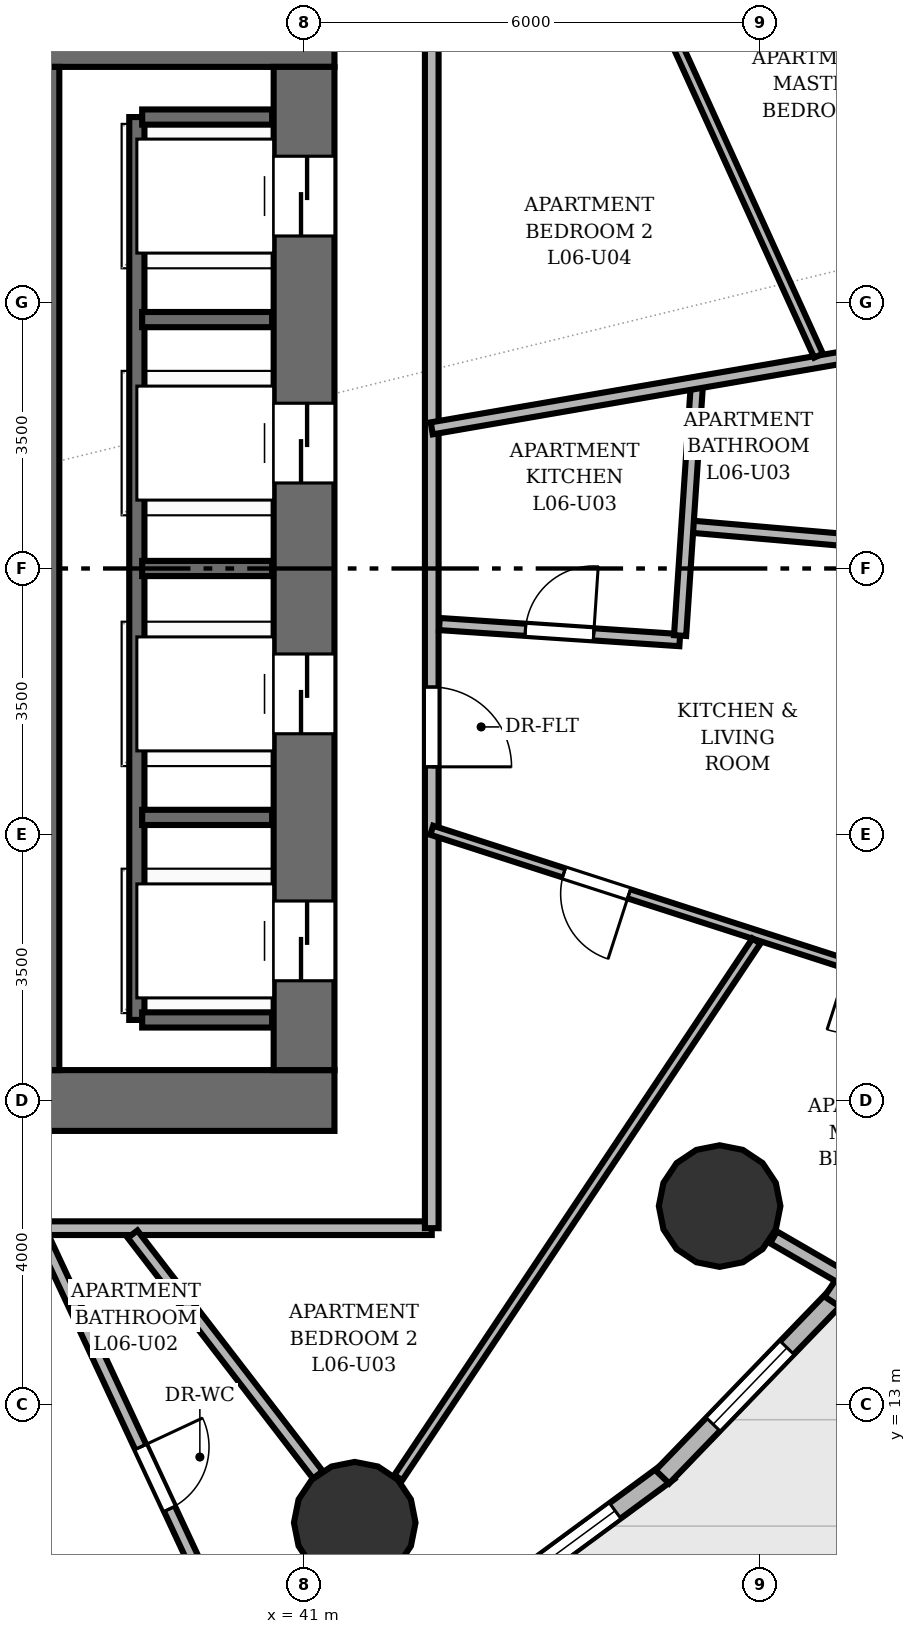
"""IFC4 building model, lengths in metres.
Left out: names, types, materials, properties, quantities, classifications, styles, units other than length and angle.
Written with IfcOpenShell. Run it as: python <this file> out.ifc"""

import sys

from ifc_helpers import new_model, si_unit, direction, frame, frame_2d, origin, origin_2d, place, context, subcontext, project, spatial, rectangle, circle, extrude, element, fill, save


model = new_model("IFC4")
c1 = context("Model", 3, precision=1e-05, world=origin(), true_north=direction((0.0, 1.0)))
c2 = subcontext(c1, "Body", "Model", "MODEL_VIEW")
j1 = project(units=[si_unit("LENGTHUNIT", "METRE"), si_unit("PLANEANGLEUNIT", "RADIAN")], contexts=[c1])
p1 = place(None, origin())
s1 = spatial("IfcSite", under=j1, at=p1, CompositionType="ELEMENT")
p2 = place(p1, origin())
s2 = spatial("IfcBuilding", under=s1, at=p2, CompositionType="ELEMENT")
p3 = place(p2, frame((0.0, 0.0, 24.8)))
s3 = spatial("IfcBuildingStorey", under=s2, at=p3, CompositionType="ELEMENT", Elevation=24.8)
p4 = place(p3, frame((22.6, 17.0, 0.0), z_axis=(0.0, 0.0, 1.0), x_axis=(1.0, 0.0, 0.0)))
e1 = element("IfcWall", 1, at=p4, inside=s3, PredefinedType="SHEAR", context=c2, shape_type="SweptSolid", body=[
    extrude(rectangle(XDim=18.8, YDim=0.8, at=frame_2d((9.4, 0.0))), origin(), (0.0, 0.0, 1.0), 3.2),
])
p5 = place(p4, frame((5.9, 0.0, 0.0)))
e2 = element("IfcOpeningElement", 2, at=p5, cuts=e1, PredefinedType="OPENING", context=c2, shape_type="SweptSolid", body=[
    extrude(rectangle(XDim=1.1, YDim=2.15, at=frame_2d((0.55, 1.075))), frame((0.0, 0.41, 0.0), z_axis=(0.0, -1.0, 0.0), x_axis=(1.0, 0.0, 0.0)), (0.0, 0.0, 1.0), 0.82),
])
p6 = place(p4, frame((9.45, 0.0, 0.0)))
e3 = element("IfcOpeningElement", 3, at=p6, cuts=e1, PredefinedType="OPENING", context=c2, shape_type="SweptSolid", body=[
    extrude(rectangle(XDim=0.9, YDim=2.1, at=frame_2d((0.45, 1.05))), frame((0.0, 0.41, 0.0), z_axis=(0.0, -1.0, 0.0), x_axis=(1.0, 0.0, 0.0)), (0.0, 0.0, 1.0), 0.82),
])
p7 = place(p3, frame((22.6, 31.0, 0.0), z_axis=(0.0, 0.0, 1.0), x_axis=(1.0, 0.0, 0.0)))
e4 = element("IfcWall", 4, at=p7, inside=s3, PredefinedType="SHEAR", context=c2, shape_type="SweptSolid", body=[
    extrude(rectangle(XDim=18.8, YDim=0.8, at=frame_2d((9.4, 0.0))), origin(), (0.0, 0.0, 1.0), 3.2),
])
p8 = place(p7, frame((11.8, 0.0, 0.0)))
e5 = element("IfcOpeningElement", 5, at=p8, cuts=e4, PredefinedType="OPENING", context=c2, shape_type="SweptSolid", body=[
    extrude(rectangle(XDim=1.1, YDim=2.15, at=frame_2d((0.55, 1.075))), frame((0.0, 0.41, 0.0), z_axis=(0.0, -1.0, 0.0), x_axis=(1.0, 0.0, 0.0)), (0.0, 0.0, 1.0), 0.82),
])
p9 = place(p3, frame((41.0, 17.4, 0.0), z_axis=(0.0, 0.0, 1.0), x_axis=(0.0, 1.0, 0.0)))
e6 = element("IfcWall", 6, at=p9, inside=s3, PredefinedType="SHEAR", context=c2, shape_type="SweptSolid", body=[
    extrude(rectangle(XDim=13.2, YDim=0.8, at=frame_2d((6.6, 0.0))), origin(), (0.0, 0.0, 1.0), 3.2),
])
p10 = place(p9, frame((1.175, 0.0, 0.0)))
e7 = element("IfcOpeningElement", 7, at=p10, cuts=e6, PredefinedType="OPENING", context=c2, shape_type="SweptSolid", body=[
    extrude(rectangle(XDim=1.05, YDim=2.15, at=frame_2d((0.525, 1.075))), frame((0.0, 0.41, 0.0), z_axis=(0.0, -1.0, 0.0), x_axis=(1.0, 0.0, 0.0)), (0.0, 0.0, 1.0), 0.82),
])
p11 = place(p9, frame((4.425, 0.0, 0.0)))
e8 = element("IfcOpeningElement", 8, at=p11, cuts=e6, PredefinedType="OPENING", context=c2, shape_type="SweptSolid", body=[
    extrude(rectangle(XDim=1.05, YDim=2.15, at=frame_2d((0.525, 1.075))), frame((0.0, 0.41, 0.0), z_axis=(0.0, -1.0, 0.0), x_axis=(1.0, 0.0, 0.0)), (0.0, 0.0, 1.0), 0.82),
])
p12 = place(p9, frame((7.725, 0.0, 0.0)))
e9 = element("IfcOpeningElement", 9, at=p12, cuts=e6, PredefinedType="OPENING", context=c2, shape_type="SweptSolid", body=[
    extrude(rectangle(XDim=1.05, YDim=2.15, at=frame_2d((0.525, 1.075))), frame((0.0, 0.41, 0.0), z_axis=(0.0, -1.0, 0.0), x_axis=(1.0, 0.0, 0.0)), (0.0, 0.0, 1.0), 0.82),
])
p13 = place(p9, frame((10.975, 0.0, 0.0)))
e10 = element("IfcOpeningElement", 10, at=p13, cuts=e6, PredefinedType="OPENING", context=c2, shape_type="SweptSolid", body=[
    extrude(rectangle(XDim=1.05, YDim=2.15, at=frame_2d((0.525, 1.075))), frame((0.0, 0.41, 0.0), z_axis=(0.0, -1.0, 0.0), x_axis=(1.0, 0.0, 0.0)), (0.0, 0.0, 1.0), 0.82),
])
p14 = place(p3, frame((37.5, 17.4, 0.0), z_axis=(0.0, 0.0, 1.0), x_axis=(0.0, 1.0, 0.0)))
e11 = element("IfcWall", 11, at=p14, inside=s3, PredefinedType="SHEAR", context=c2, shape_type="SweptSolid", body=[
    extrude(rectangle(XDim=13.2, YDim=0.56, at=frame_2d((6.6, 0.0))), origin(), (0.0, 0.0, 1.0), 3.2),
])
for number, where, z_axis, x_axis in (
    (12, (41.667, 11.445, 0.0), (0.0, 0.0, 1.0), (1.0, 0.0, 0.0)),
    (13, (46.468, 15.611, 0.0), (0.0, 0.0, 1.0), (1.0, 0.0, 0.0)),
):
    element("IfcColumn", number, at=place(p3, frame(where, z_axis=z_axis, x_axis=x_axis)), inside=s3, PredefinedType="COLUMN", context=c2, shape_type="SweptSolid", body=[
        extrude(circle(Radius=0.8, at=origin_2d()), origin(), (0.0, 0.0, 1.0), 3.2),
    ])
p15 = place(p3, frame((45.798, 12.12, 0.0), z_axis=(0.0, 0.0, 1.0), x_axis=(-0.805405938507, -0.592723606935, 0.0)))
e14 = element("IfcWall", 14, at=p15, inside=s3, PredefinedType="SOLIDWALL", context=c2, shape_type="SweptSolid", body=[
    extrude(rectangle(XDim=3.399, YDim=0.25, at=frame_2d((1.699, 0.0))), origin(), (0.0, 0.0, 1.0), 2.96),
])
p16 = place(p15, frame((0.875, 0.0, 0.85)))
e15 = element("IfcOpeningElement", 15, at=p16, cuts=e14, PredefinedType="OPENING", context=c2, shape_type="SweptSolid", body=[
    extrude(rectangle(XDim=1.65, YDim=1.55, at=frame_2d((0.825, 0.775))), frame((0.0, 0.135, 0.0), z_axis=(0.0, -1.0, 0.0), x_axis=(1.0, 0.0, 0.0)), (0.0, 0.0, 1.0), 0.27),
])
p17 = place(p3, frame((48.021, 14.438, 0.0), z_axis=(0.0, 0.0, 1.0), x_axis=(-0.694392538781, -0.719596416115, 0.0)))
e16 = element("IfcWall", 16, at=p17, inside=s3, PredefinedType="SOLIDWALL", context=c2, shape_type="SweptSolid", body=[
    extrude(rectangle(XDim=3.323, YDim=0.25, at=frame_2d((1.661, 0.0))), origin(), (0.0, 0.0, 1.0), 2.96),
])
p18 = place(p17, frame((0.961, 0.0, 0.85)))
e17 = element("IfcOpeningElement", 17, at=p18, cuts=e16, PredefinedType="OPENING", context=c2, shape_type="SweptSolid", body=[
    extrude(rectangle(XDim=1.4, YDim=1.55, at=frame_2d((0.7, 0.775))), frame((0.0, 0.135, 0.0), z_axis=(0.0, -1.0, 0.0), x_axis=(1.0, 0.0, 0.0)), (0.0, 0.0, 1.0), 0.27),
])
p19 = place(p3, frame((49.758, 17.047, 0.0), z_axis=(0.0, 0.0, 1.0), x_axis=(-0.556764929833, -0.83067009872, 0.0)))
e18 = element("IfcWall", 18, at=p19, inside=s3, PredefinedType="SOLIDWALL", context=c2, shape_type="SweptSolid", body=[
    extrude(rectangle(XDim=3.244, YDim=0.25, at=frame_2d((1.622, 0.0))), origin(), (0.0, 0.0, 1.0), 2.96),
])
p20 = place(p3, frame((38.8, 18.06, 0.0), z_axis=(0.0, 0.0, 1.0), x_axis=(0.0, 1.0, 0.0)))
e19 = element("IfcWall", 19, at=p20, inside=s3, PredefinedType="SHEAR", context=c2, shape_type="SweptSolid", body=[
    extrude(rectangle(XDim=11.88, YDim=0.2, at=frame_2d((5.94, 0.0))), origin(), (0.0, 0.0, 1.0), 3.2),
])
for number, where, z_axis, x_axis in (
    (20, (38.87, 18.06, 0.0), (0.0, 0.0, 1.0), (1.0, 0.0, 0.0)),
    (21, (38.87, 29.94, 0.0), (0.0, 0.0, 1.0), (1.0, 0.0, 0.0)),
    (22, (38.87, 20.725, 0.0), (0.0, 0.0, 1.0), (1.0, 0.0, 0.0)),
    (23, (38.87, 24.0, 0.0), (0.0, 0.0, 1.0), (1.0, 0.0, 0.0)),
    (24, (38.87, 27.275, 0.0), (0.0, 0.0, 1.0), (1.0, 0.0, 0.0)),
):
    element("IfcWall", number, at=place(p3, frame(where, z_axis=z_axis, x_axis=x_axis)), inside=s3, PredefinedType="SHEAR", context=c2, shape_type="SweptSolid", body=[
        extrude(rectangle(XDim=1.71, YDim=0.2, at=frame_2d((0.855, 0.0))), origin(), (0.0, 0.0, 1.0), 3.2),
    ])
p21 = place(p3, frame((47.177, 15.2, 0.0), z_axis=(0.0, 0.0, 1.0), x_axis=(0.865001274409, -0.501769663562, 0.0)))
e25 = element("IfcWall", 25, at=p21, inside=s3, PredefinedType="PARTITIONING", context=c2, shape_type="SweptSolid", body=[
    extrude(rectangle(XDim=1.063, YDim=0.18, at=frame_2d((0.531, 0.0))), origin(), (0.0, 0.0, 1.0), 2.178),
])
p22 = place(p3, frame((42.68, 15.32, 0.0), z_axis=(0.0, 0.0, 1.0), x_axis=(-1.0, 0.0, 0.0)))
e26 = element("IfcWall", 26, at=p22, inside=s3, PredefinedType="PARTITIONING", context=c2, shape_type="SweptSolid", body=[
    extrude(rectangle(XDim=8.823, YDim=0.18, at=frame_2d((4.411, 0.0))), origin(), (0.0, 0.0, 1.0), 2.955),
])
p23 = place(p22, frame((6.462, 0.0, 0.0)))
e27 = element("IfcOpeningElement", 27, at=p23, cuts=e26, PredefinedType="OPENING", context=c2, shape_type="SweptSolid", body=[
    extrude(rectangle(XDim=1.05, YDim=2.15, at=frame_2d((0.525, 1.075))), frame((0.0, 0.1, 0.0), z_axis=(0.0, -1.0, 0.0), x_axis=(1.0, 0.0, 0.0)), (0.0, 0.0, 1.0), 0.2),
])
p24 = place(p3, frame((42.68, 32.68, 0.0), z_axis=(0.0, 0.0, 1.0), x_axis=(0.0, -1.0, 0.0)))
e28 = element("IfcWall", 28, at=p24, inside=s3, PredefinedType="PARTITIONING", context=c2, shape_type="SweptSolid", body=[
    extrude(rectangle(XDim=17.36, YDim=0.18, at=frame_2d((8.68, 0.0))), origin(), (0.0, 0.0, 1.0), 2.955),
])
p25 = place(p24, frame((10.24, 0.0, 0.0)))
e29 = element("IfcOpeningElement", 29, at=p25, cuts=e28, PredefinedType="OPENING", context=c2, shape_type="SweptSolid", body=[
    extrude(rectangle(XDim=1.05, YDim=2.15, at=frame_2d((0.525, 1.075))), frame((0.0, 0.1, 0.0), z_axis=(0.0, -1.0, 0.0), x_axis=(1.0, 0.0, 0.0)), (0.0, 0.0, 1.0), 0.2),
])
p26 = place(p3, frame((37.55, 15.229, 0.0), z_axis=(0.0, 0.0, 1.0), x_axis=(0.422745211231, -0.906248578692, 0.0)))
e30 = element("IfcWall", 30, at=p26, inside=s3, PredefinedType="PLUMBINGWALL", context=c2, shape_type="SweptSolid", body=[
    extrude(rectangle(XDim=7.052, YDim=0.16, at=frame_2d((3.526, 0.0))), origin(), (0.0, 0.0, 1.0), 2.641),
])
p27 = place(p26, frame((3.076, 0.0, 0.0)))
e31 = element("IfcOpeningElement", 31, at=p27, cuts=e30, PredefinedType="OPENING", context=c2, shape_type="SweptSolid", body=[
    extrude(rectangle(XDim=0.9, YDim=2.1, at=frame_2d((0.45, 1.05))), frame((0.0, 0.09, 0.0), z_axis=(0.0, -1.0, 0.0), x_axis=(1.0, 0.0, 0.0)), (0.0, 0.0, 1.0), 0.18),
])
p28 = place(p3, frame((38.744, 15.241, 0.0), z_axis=(0.0, 0.0, 1.0), x_axis=(0.610097434882, -0.792326397358, 0.0)))
e32 = element("IfcWall", 32, at=p28, inside=s3, PredefinedType="PLUMBINGWALL", context=c2, shape_type="SweptSolid", body=[
    extrude(rectangle(XDim=3.997, YDim=0.16, at=frame_2d((1.998, 0.0))), origin(), (0.0, 0.0, 1.0), 2.178),
])
p29 = place(p3, frame((46.044, 24.555, 0.0), z_axis=(0.0, 0.0, 1.0), x_axis=(0.996262385211, -0.086378584226, 0.0)))
e33 = element("IfcWall", 33, at=p29, inside=s3, PredefinedType="PLUMBINGWALL", context=c2, shape_type="SweptSolid", body=[
    extrude(rectangle(XDim=5.54, YDim=0.16, at=frame_2d((2.77, 0.0))), origin(), (0.0, 0.0, 1.0), 2.641),
])
p30 = place(p29, frame((2.32, 0.0, 0.0)))
e34 = element("IfcOpeningElement", 34, at=p30, cuts=e33, PredefinedType="OPENING", context=c2, shape_type="SweptSolid", body=[
    extrude(rectangle(XDim=0.9, YDim=2.1, at=frame_2d((0.45, 1.05))), frame((0.0, 0.09, 0.0), z_axis=(0.0, -1.0, 0.0), x_axis=(1.0, 0.0, 0.0)), (0.0, 0.0, 1.0), 0.18),
])
p31 = place(p3, frame((50.195, 18.132, 0.0), z_axis=(0.0, 0.0, 1.0), x_axis=(-0.951723769721, 0.306955804879, 0.0)))
e35 = element("IfcWall", 35, at=p31, inside=s3, PredefinedType="PARTITIONING", context=c2, shape_type="SweptSolid", body=[
    extrude(rectangle(XDim=7.896, YDim=0.125, at=frame_2d((3.948, 0.0))), origin(), (0.0, 0.0, 1.0), 2.955),
])
p32 = place(p31, frame((1.241, 0.0, 0.0)))
e36 = element("IfcOpeningElement", 36, at=p32, cuts=e35, PredefinedType="OPENING", context=c2, shape_type="SweptSolid", body=[
    extrude(rectangle(XDim=0.9, YDim=2.1, at=frame_2d((0.45, 1.05))), frame((0.0, 0.073, 0.0), z_axis=(0.0, -1.0, 0.0), x_axis=(1.0, 0.0, 0.0)), (0.0, 0.0, 1.0), 0.145),
])
p33 = place(p31, frame((5.169, 0.0, 0.0)))
e37 = element("IfcOpeningElement", 37, at=p33, cuts=e35, PredefinedType="OPENING", context=c2, shape_type="SweptSolid", body=[
    extrude(rectangle(XDim=0.9, YDim=2.1, at=frame_2d((0.45, 1.05))), frame((0.0, 0.073, 0.0), z_axis=(0.0, -1.0, 0.0), x_axis=(1.0, 0.0, 0.0)), (0.0, 0.0, 1.0), 0.145),
])
p34 = place(p3, frame((42.78, 23.269, 0.0), z_axis=(0.0, 0.0, 1.0), x_axis=(0.99776911562, -0.066759208461, 0.0)))
e38 = element("IfcWall", 38, at=p34, inside=s3, PredefinedType="PLUMBINGWALL", context=c2, shape_type="SweptSolid", body=[
    extrude(rectangle(XDim=3.171, YDim=0.16, at=frame_2d((1.585, 0.0))), origin(), (0.0, 0.0, 1.0), 2.641),
])
p35 = place(p34, frame((1.135, 0.0, 0.0)))
e39 = element("IfcOpeningElement", 39, at=p35, cuts=e38, PredefinedType="OPENING", context=c2, shape_type="SweptSolid", body=[
    extrude(rectangle(XDim=0.9, YDim=2.1, at=frame_2d((0.45, 1.05))), frame((0.0, 0.09, 0.0), z_axis=(0.0, -1.0, 0.0), x_axis=(1.0, 0.0, 0.0)), (0.0, 0.0, 1.0), 0.18),
])
p36 = place(p3, frame((45.947, 23.117, 0.0), z_axis=(0.0, 0.0, 1.0), x_axis=(0.066888153037, 0.997760479766, 0.0)))
e40 = element("IfcWall", 40, at=p36, inside=s3, PredefinedType="PLUMBINGWALL", context=c2, shape_type="SweptSolid", body=[
    extrude(rectangle(XDim=3.336, YDim=0.16, at=frame_2d((1.668, 0.0))), origin(), (0.0, 0.0, 1.0), 2.955),
])
p37 = place(p3, frame((42.68, 25.844, 0.0), z_axis=(0.0, 0.0, 1.0), x_axis=(0.985435597438, 0.170049061456, 0.0)))
e41 = element("IfcWall", 41, at=p37, inside=s3, PredefinedType="PLUMBINGWALL", context=c2, shape_type="SweptSolid", body=[
    extrude(rectangle(XDim=5.694, YDim=0.16, at=frame_2d((2.847, 0.0))), origin(), (0.0, 0.0, 1.0), 2.178),
])
p38 = place(p3, frame((42.24, 12.037, 0.0), z_axis=(0.0, 0.0, 1.0), x_axis=(0.55508513016, 0.831793543059, 0.0)))
e42 = element("IfcWall", 42, at=p38, inside=s3, PredefinedType="PARTITIONING", context=c2, shape_type="SweptSolid", body=[
    extrude(rectangle(XDim=8.488, YDim=0.125, at=frame_2d((4.244, 0.0))), origin(), (0.0, 0.0, 1.0), 2.328),
])
p39 = place(p3, frame((47.769, 26.801, 0.0), z_axis=(0.0, 0.0, 1.0), x_axis=(-0.414076998559, 0.910241857565, 0.0)))
e43 = element("IfcWall", 43, at=p39, inside=s3, PredefinedType="PARTITIONING", context=c2, shape_type="SweptSolid", body=[
    extrude(rectangle(XDim=8.658, YDim=0.125, at=frame_2d((4.329, 0.0))), origin(), (0.0, 0.0, 1.0), 2.328),
])
p40 = place(p16, origin())
e44 = element("IfcWindow", 44, at=p40, inside=s3, PartitioningType="SINGLE_PANEL", PredefinedType="WINDOW", context=c2, shape_type="SweptSolid", body=[
    extrude(rectangle(XDim=1.65, YDim=1.55, at=frame_2d((0.825, 0.775))), frame((0.0, 0.03, 0.0), z_axis=(0.0, -1.0, 0.0), x_axis=(1.0, 0.0, 0.0)), (0.0, 0.0, 1.0), 0.06),
])
fill(e15, e44)
p41 = place(p18, origin())
e45 = element("IfcWindow", 45, at=p41, inside=s3, PartitioningType="SINGLE_PANEL", PredefinedType="WINDOW", context=c2, shape_type="SweptSolid", body=[
    extrude(rectangle(XDim=1.4, YDim=1.55, at=frame_2d((0.7, 0.775))), frame((0.0, 0.03, 0.0), z_axis=(0.0, -1.0, 0.0), x_axis=(1.0, 0.0, 0.0)), (0.0, 0.0, 1.0), 0.06),
])
fill(e17, e45)
p42 = place(p10, origin())
e46 = element("IfcDoor", 46, at=p42, inside=s3, OperationType="DOUBLE_DOOR_SLIDING", PredefinedType="DOOR", context=c2, shape_type="SweptSolid", body=[
    extrude(rectangle(XDim=1.05, YDim=2.15, at=frame_2d((0.525, 1.075))), frame((0.0, 0.025, 0.0), z_axis=(0.0, -1.0, 0.0), x_axis=(1.0, 0.0, 0.0)), (0.0, 0.0, 1.0), 0.05),
])
fill(e7, e46)
p43 = place(p11, origin())
e47 = element("IfcDoor", 47, at=p43, inside=s3, OperationType="DOUBLE_DOOR_SLIDING", PredefinedType="DOOR", context=c2, shape_type="SweptSolid", body=[
    extrude(rectangle(XDim=1.05, YDim=2.15, at=frame_2d((0.525, 1.075))), frame((0.0, 0.025, 0.0), z_axis=(0.0, -1.0, 0.0), x_axis=(1.0, 0.0, 0.0)), (0.0, 0.0, 1.0), 0.05),
])
fill(e8, e47)
p44 = place(p12, origin())
e48 = element("IfcDoor", 48, at=p44, inside=s3, OperationType="DOUBLE_DOOR_SLIDING", PredefinedType="DOOR", context=c2, shape_type="SweptSolid", body=[
    extrude(rectangle(XDim=1.05, YDim=2.15, at=frame_2d((0.525, 1.075))), frame((0.0, 0.025, 0.0), z_axis=(0.0, -1.0, 0.0), x_axis=(1.0, 0.0, 0.0)), (0.0, 0.0, 1.0), 0.05),
])
fill(e9, e48)
p45 = place(p13, origin())
e49 = element("IfcDoor", 49, at=p45, inside=s3, OperationType="DOUBLE_DOOR_SLIDING", PredefinedType="DOOR", context=c2, shape_type="SweptSolid", body=[
    extrude(rectangle(XDim=1.05, YDim=2.15, at=frame_2d((0.525, 1.075))), frame((0.0, 0.025, 0.0), z_axis=(0.0, -1.0, 0.0), x_axis=(1.0, 0.0, 0.0)), (0.0, 0.0, 1.0), 0.05),
])
fill(e10, e49)
p46 = place(p27, origin())
e50 = element("IfcDoor", 50, at=p46, inside=s3, OperationType="SINGLE_SWING_LEFT", PredefinedType="DOOR", context=c2, shape_type="SweptSolid", body=[
    extrude(rectangle(XDim=0.9, YDim=2.1, at=frame_2d((0.45, 1.05))), frame((0.0, 0.025, 0.0), z_axis=(0.0, -1.0, 0.0), x_axis=(1.0, 0.0, 0.0)), (0.0, 0.0, 1.0), 0.05),
])
fill(e31, e50)
p47 = place(p25, origin())
e51 = element("IfcDoor", 51, at=p47, inside=s3, OperationType="SINGLE_SWING_RIGHT", PredefinedType="DOOR", context=c2, shape_type="SweptSolid", body=[
    extrude(rectangle(XDim=1.05, YDim=2.15, at=frame_2d((0.525, 1.075))), frame((0.0, 0.025, 0.0), z_axis=(0.0, -1.0, 0.0), x_axis=(1.0, 0.0, 0.0)), (0.0, 0.0, 1.0), 0.05),
])
fill(e29, e51)
p48 = place(p33, origin())
e52 = element("IfcDoor", 52, at=p48, inside=s3, OperationType="SINGLE_SWING_LEFT", PredefinedType="DOOR", context=c2, shape_type="SweptSolid", body=[
    extrude(rectangle(XDim=0.9, YDim=2.1, at=frame_2d((0.45, 1.05))), frame((0.0, 0.025, 0.0), z_axis=(0.0, -1.0, 0.0), x_axis=(1.0, 0.0, 0.0)), (0.0, 0.0, 1.0), 0.05),
])
fill(e37, e52)
p49 = place(p35, origin())
e53 = element("IfcDoor", 53, at=p49, inside=s3, OperationType="SINGLE_SWING_RIGHT", PredefinedType="DOOR", context=c2, shape_type="SweptSolid", body=[
    extrude(rectangle(XDim=0.9, YDim=2.1, at=frame_2d((0.45, 1.05))), frame((0.0, 0.025, 0.0), z_axis=(0.0, -1.0, 0.0), x_axis=(1.0, 0.0, 0.0)), (0.0, 0.0, 1.0), 0.05),
])
fill(e39, e53)
save(model, sys.argv[1])
